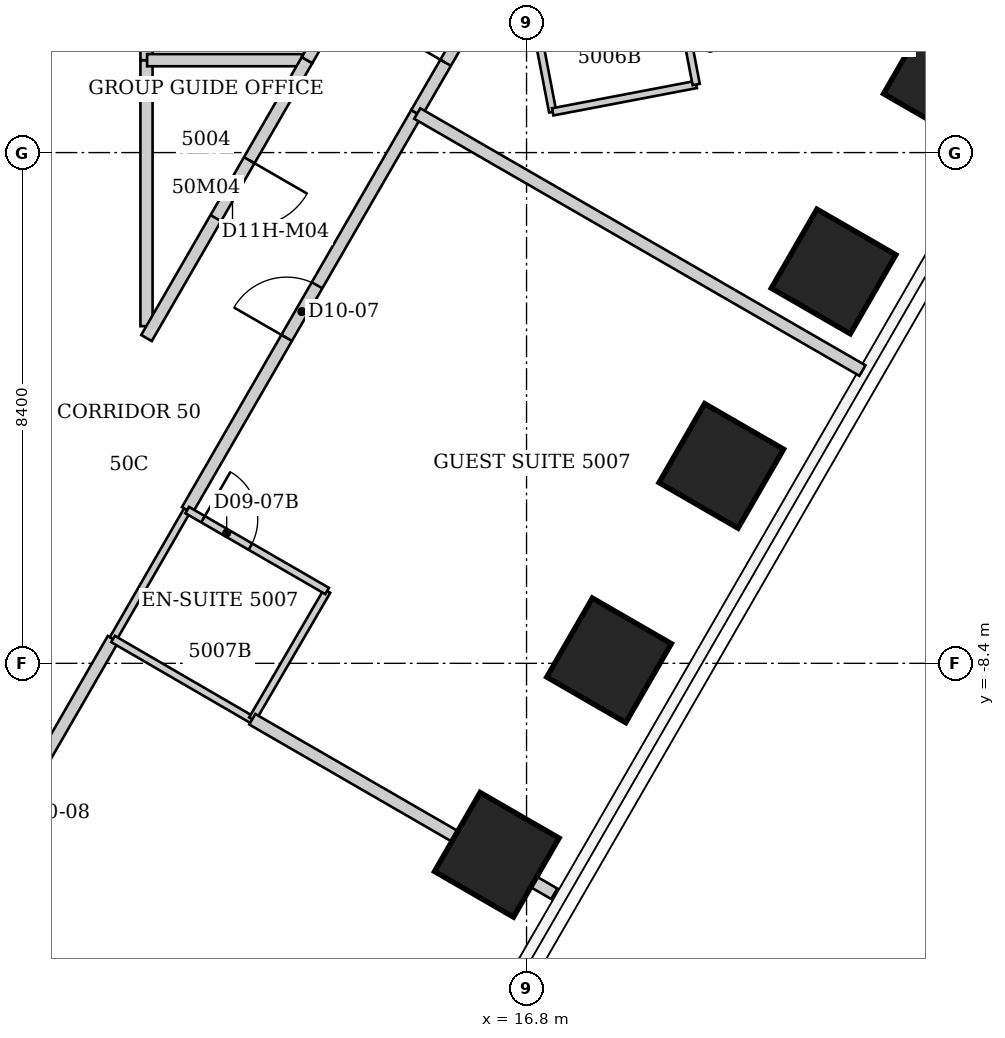
"""IFC4 building model, lengths in metres.
Left out: names, types, materials, properties, quantities, classifications, styles, units other than length and angle.
Written with IfcOpenShell. Run it as: python <this file> out.ifc"""

import sys

from ifc_helpers import new_model, si_unit, direction, frame, frame_2d, origin, origin_2d, place, context, subcontext, project, spatial, rectangle, extrude, element, fill, save


model = new_model("IFC4")
c1 = context("Model", 3, precision=1e-05, world=origin(), true_north=direction((0.0, 1.0)))
c2 = subcontext(c1, "Body", "Model", "MODEL_VIEW")
j1 = project(units=[si_unit("LENGTHUNIT", "METRE"), si_unit("PLANEANGLEUNIT", "RADIAN")], contexts=[c1])
p1 = place(None, origin())
s1 = spatial("IfcSite", under=j1, at=p1, CompositionType="ELEMENT")
p2 = place(p1, origin())
s2 = spatial("IfcBuilding", under=s1, at=p2, CompositionType="ELEMENT")
p3 = place(p2, frame((0.0, 0.0, 202.2)))
s3 = spatial("IfcBuildingStorey", under=s2, at=p3, CompositionType="ELEMENT", Elevation=202.2)
for number, where, z_axis, x_axis in (
    (1, (23.696, 1.242, 0.0), (0.0, 0.0, 1.0), (0.866, -0.5, 0.0)),
    (2, (21.85, -1.956, 0.0), (0.0, 0.0, 1.0), (0.866, -0.5, 0.0)),
    (3, (20.003, -5.153, 0.0), (0.0, 0.0, 1.0), (0.866, -0.5, 0.0)),
    (4, (18.157, -8.351, 0.0), (0.0, 0.0, 1.0), (0.866, -0.5, 0.0)),
    (5, (16.311, -11.549, 0.0), (0.0, 0.0, 1.0), (0.866, -0.5, 0.0)),
):
    element("IfcColumn", number, at=place(p3, frame(where, z_axis=z_axis, x_axis=x_axis)), inside=s3, PredefinedType="COLUMN", context=c2, shape_type="SweptSolid", body=[
        extrude(rectangle(XDim=1.5, YDim=1.5, at=origin_2d()), origin(), (0.0, 0.0, 1.0), 3.8),
    ])
p4 = place(p3, frame((6.7, -13.72, 0.0), z_axis=(0.0, 0.0, 1.0), x_axis=(0.499729921425, 0.866181277581, 0.0)))
e6 = element("IfcWall", 6, at=p4, inside=s3, PredefinedType="PARTITIONING", context=c2, shape_type="SweptSolid", body=[
    extrude(rectangle(XDim=6.604, YDim=0.2, at=frame_2d((3.302, 0.0))), origin(), (0.0, 0.0, 1.0), 3.64),
])
p5 = place(p4, frame((2.802, 0.0, 0.0)))
e7 = element("IfcOpeningElement", 7, at=p5, cuts=e6, PredefinedType="OPENING", context=c2, shape_type="SweptSolid", body=[
    extrude(rectangle(XDim=1.0, YDim=2.13, at=frame_2d((0.5, 1.065))), frame((0.0, 0.1, 0.0), z_axis=(0.0, -1.0, 0.0), x_axis=(1.0, 0.0, 0.0)), (0.0, 0.0, 1.0), 0.2),
])
p6 = place(p3, frame((9.999, -8.0, 0.0), z_axis=(0.0, 0.0, 1.0), x_axis=(0.49917796633, 0.866499485245, 0.0)))
e8 = element("IfcWall", 8, at=p6, inside=s3, PredefinedType="PARTITIONING", context=c2, shape_type="SweptSolid", body=[
    extrude(rectangle(XDim=2.446, YDim=0.12, at=frame_2d((1.223, 0.0))), origin(), (0.0, 0.0, 1.0), 3.64),
])
p7 = place(p3, frame((10.55, -2.855, 0.0), z_axis=(0.0, 0.0, 1.0), x_axis=(0.0, 1.0, 0.0)))
e9 = element("IfcWall", 9, at=p7, inside=s3, PredefinedType="PARTITIONING", context=c2, shape_type="SweptSolid", body=[
    extrude(rectangle(XDim=4.375, YDim=0.2, at=frame_2d((2.188, 0.0))), origin(), (0.0, 0.0, 1.0), 3.64),
])
p8 = place(p3, frame((10.55, 1.52, 0.0), z_axis=(0.0, 0.0, 1.0), x_axis=(0.0, 1.0, 0.0)))
e10 = element("IfcWall", 10, at=p8, inside=s3, PredefinedType="PARTITIONING", context=c2, shape_type="SweptSolid", body=[
    extrude(rectangle(XDim=4.57, YDim=0.2, at=frame_2d((2.285, 0.0))), origin(), (0.0, 0.0, 1.0), 3.64),
])
p9 = place(p8, frame((1.735, 0.0, 0.0)))
e11 = element("IfcOpeningElement", 11, at=p9, cuts=e10, PredefinedType="OPENING", context=c2, shape_type="SweptSolid", body=[
    extrude(rectangle(XDim=1.1, YDim=2.2, at=frame_2d((0.55, 1.1))), frame((0.0, 0.1, 0.0), z_axis=(0.0, -1.0, 0.0), x_axis=(1.0, 0.0, 0.0)), (0.0, 0.0, 1.0), 0.2),
])
p10 = place(p3, frame((10.56, 1.52, 0.0), z_axis=(0.0, 0.0, 1.0), x_axis=(1.0, 0.0, 0.0)))
e12 = element("IfcWall", 12, at=p10, inside=s3, PredefinedType="PARTITIONING", context=c2, shape_type="SweptSolid", body=[
    extrude(rectangle(XDim=2.55, YDim=0.2, at=frame_2d((1.275, 0.0))), origin(), (0.0, 0.0, 1.0), 3.64),
])
p11 = place(p3, frame((11.22, -5.88, 0.0), z_axis=(0.0, 0.0, 1.0), x_axis=(0.500004606796, 0.866022744033, 0.0)))
e13 = element("IfcWall", 13, at=p11, inside=s3, PredefinedType="PARTITIONING", context=c2, shape_type="SweptSolid", body=[
    extrude(rectangle(XDim=7.54, YDim=0.2, at=frame_2d((3.77, 0.0))), origin(), (0.0, 0.0, 1.0), 3.64),
])
p12 = place(p11, frame((3.27, 0.0, 0.0)))
e14 = element("IfcOpeningElement", 14, at=p12, cuts=e13, PredefinedType="OPENING", context=c2, shape_type="SweptSolid", body=[
    extrude(rectangle(XDim=1.0, YDim=2.13, at=frame_2d((0.5, 1.065))), frame((0.0, 0.1, 0.0), z_axis=(0.0, -1.0, 0.0), x_axis=(1.0, 0.0, 0.0)), (0.0, 0.0, 1.0), 0.2),
])
p13 = place(p3, frame((12.29, -9.33, 0.0), z_axis=(0.0, 0.0, 1.0), x_axis=(-0.864726954997, 0.502242265546, 0.0)))
e15 = element("IfcWall", 15, at=p13, inside=s3, PredefinedType="PARTITIONING", context=c2, shape_type="SweptSolid", body=[
    extrude(rectangle(XDim=2.648, YDim=0.12, at=frame_2d((1.324, 0.0))), origin(), (0.0, 0.0, 1.0), 3.038),
])
p14 = place(p3, frame((12.29, -9.32, 0.0), z_axis=(0.0, 0.0, 1.0), x_axis=(0.503591322258, 0.863942000453, 0.0)))
e16 = element("IfcWall", 16, at=p14, inside=s3, PredefinedType="PARTITIONING", context=c2, shape_type="SweptSolid", body=[
    extrude(rectangle(XDim=2.442, YDim=0.12, at=frame_2d((1.221, 0.0))), origin(), (0.0, 0.0, 1.0), 3.64),
])
p15 = place(p3, frame((12.29, -9.32, 0.0), z_axis=(0.0, 0.0, 1.0), x_axis=(0.865820408554, -0.500354894182, 0.0)))
e17 = element("IfcWall", 17, at=p15, inside=s3, PredefinedType="PARTITIONING", context=c2, shape_type="SweptSolid", body=[
    extrude(rectangle(XDim=5.736, YDim=0.2, at=frame_2d((2.868, 0.0))), origin(), (0.0, 0.0, 1.0), 3.038),
])
p16 = place(p3, frame((13.19, 1.52, 0.0), z_axis=(0.0, 0.0, 1.0), x_axis=(-0.500193590286, -0.865913605527, 0.0)))
e18 = element("IfcWall", 18, at=p16, inside=s3, PredefinedType="PARTITIONING", context=c2, shape_type="SweptSolid", body=[
    extrude(rectangle(XDim=5.278, YDim=0.2, at=frame_2d((2.639, 0.0))), origin(), (0.0, 0.0, 1.0), 3.64),
])
p17 = place(p16, frame((1.9, 0.0, 0.0)))
e19 = element("IfcOpeningElement", 19, at=p17, cuts=e18, PredefinedType="OPENING", context=c2, shape_type="SweptSolid", body=[
    extrude(rectangle(XDim=1.1, YDim=2.2, at=frame_2d((0.55, 1.1))), frame((0.0, 0.1, 0.0), z_axis=(0.0, -1.0, 0.0), x_axis=(1.0, 0.0, 0.0)), (0.0, 0.0, 1.0), 0.2),
])
p18 = place(p3, frame((13.52, -7.21, 0.0), z_axis=(0.0, 0.0, 1.0), x_axis=(-0.865675724273, 0.500605174168, 0.0)))
e20 = element("IfcWall", 20, at=p18, inside=s3, PredefinedType="PARTITIONING", context=c2, shape_type="SweptSolid", body=[
    extrude(rectangle(XDim=2.657, YDim=0.12, at=frame_2d((1.329, 0.0))), origin(), (0.0, 0.0, 1.0), 3.64),
])
p19 = place(p18, frame((1.457, 0.0, 0.0)))
e21 = element("IfcOpeningElement", 21, at=p19, cuts=e20, PredefinedType="OPENING", context=c2, shape_type="SweptSolid", body=[
    extrude(rectangle(XDim=0.9, YDim=2.03, at=frame_2d((0.45, 1.015))), frame((0.0, 0.06, 0.0), z_axis=(0.0, -1.0, 0.0), x_axis=(1.0, 0.0, 0.0)), (0.0, 0.0, 1.0), 0.12),
])
p20 = place(p3, frame((14.83, 4.37, 0.0), z_axis=(0.0, 0.0, 1.0), x_axis=(-0.498775186059, -0.866731396554, 0.0)))
e22 = element("IfcWall", 22, at=p20, inside=s3, PredefinedType="PARTITIONING", context=c2, shape_type="SweptSolid", body=[
    extrude(rectangle(XDim=3.288, YDim=0.2, at=frame_2d((1.644, 0.0))), origin(), (0.0, 0.0, 1.0), 3.64),
])
p21 = place(p3, frame((14.99, 0.65, 0.0), z_axis=(0.0, 0.0, 1.0), x_axis=(0.501330358107, 0.865255957529, 0.0)))
e23 = element("IfcWall", 23, at=p21, inside=s3, PredefinedType="PARTITIONING", context=c2, shape_type="SweptSolid", body=[
    extrude(rectangle(XDim=2.912, YDim=0.2, at=frame_2d((1.456, 0.0))), origin(), (0.0, 0.0, 1.0), 3.64),
])
p22 = place(p21, frame((0.956, 0.0, 0.0)))
e24 = element("IfcOpeningElement", 24, at=p22, cuts=e23, PredefinedType="OPENING", context=c2, shape_type="SweptSolid", body=[
    extrude(rectangle(XDim=1.0, YDim=2.13, at=frame_2d((0.5, 1.065))), frame((0.0, 0.1, 0.0), z_axis=(0.0, -1.0, 0.0), x_axis=(1.0, 0.0, 0.0)), (0.0, 0.0, 1.0), 0.2),
])
p23 = place(p3, frame((16.74, 3.22, 0.0), z_axis=(0.0, 0.0, 1.0), x_axis=(0.188697442844, -0.982035271802, 0.0)))
e25 = element("IfcWall", 25, at=p23, inside=s3, PredefinedType="PARTITIONING", context=c2, shape_type="SweptSolid", body=[
    extrude(rectangle(XDim=2.597, YDim=0.12, at=frame_2d((1.298, 0.0))), origin(), (0.0, 0.0, 1.0), 3.64),
])
p24 = place(p3, frame((17.23, 0.67, 0.0), z_axis=(0.0, 0.0, 1.0), x_axis=(0.982288725898, 0.187373581313, 0.0)))
e26 = element("IfcWall", 26, at=p24, inside=s3, PredefinedType="PARTITIONING", context=c2, shape_type="SweptSolid", body=[
    extrude(rectangle(XDim=2.403, YDim=0.12, at=frame_2d((1.201, 0.0))), origin(), (0.0, 0.0, 1.0), 3.64),
])
p25 = place(p3, frame((19.59, 1.12, 0.0), z_axis=(0.0, 0.0, 1.0), x_axis=(-0.188003058159, 0.982168442846, 0.0)))
e27 = element("IfcWall", 27, at=p25, inside=s3, PredefinedType="PARTITIONING", context=c2, shape_type="SweptSolid", body=[
    extrude(rectangle(XDim=2.606, YDim=0.12, at=frame_2d((1.303, 0.0))), origin(), (0.0, 0.0, 1.0), 3.64),
])
p26 = place(p25, frame((1.406, 0.0, 0.0)))
e28 = element("IfcOpeningElement", 28, at=p26, cuts=e27, PredefinedType="OPENING", context=c2, shape_type="SweptSolid", body=[
    extrude(rectangle(XDim=0.9, YDim=2.03, at=frame_2d((0.45, 1.015))), frame((0.0, 0.06, 0.0), z_axis=(0.0, -1.0, 0.0), x_axis=(1.0, 0.0, 0.0)), (0.0, 0.0, 1.0), 0.12),
])
p27 = place(p3, frame((22.324, -3.585, 0.0), z_axis=(0.0, 0.0, 1.0), x_axis=(-0.865987918257, 0.500064921217, 0.0)))
e29 = element("IfcWall", 29, at=p27, inside=s3, PredefinedType="PARTITIONING", context=c2, shape_type="SweptSolid", body=[
    extrude(rectangle(XDim=8.454, YDim=0.2, at=frame_2d((4.227, 0.0))), origin(), (0.0, 0.0, 1.0), 3.64),
])
p28 = place(p22, origin())
e30 = element("IfcDoor", 30, at=p28, inside=s3, OperationType="SINGLE_SWING_LEFT", PredefinedType="DOOR", context=c2, shape_type="SweptSolid", body=[
    extrude(rectangle(XDim=1.0, YDim=2.13, at=frame_2d((0.5, 1.065))), frame((0.0, 0.025, 0.0), z_axis=(0.0, -1.0, 0.0), x_axis=(1.0, 0.0, 0.0)), (0.0, 0.0, 1.0), 0.05),
])
fill(e24, e30)
p29 = place(p12, origin())
e31 = element("IfcDoor", 31, at=p29, inside=s3, OperationType="SINGLE_SWING_LEFT", PredefinedType="DOOR", context=c2, shape_type="SweptSolid", body=[
    extrude(rectangle(XDim=1.0, YDim=2.13, at=frame_2d((0.5, 1.065))), frame((0.0, 0.025, 0.0), z_axis=(0.0, -1.0, 0.0), x_axis=(1.0, 0.0, 0.0)), (0.0, 0.0, 1.0), 0.05),
])
fill(e14, e31)
p30 = place(p19, origin())
e32 = element("IfcDoor", 32, at=p30, inside=s3, OperationType="SINGLE_SWING_RIGHT", PredefinedType="DOOR", context=c2, shape_type="SweptSolid", body=[
    extrude(rectangle(XDim=0.9, YDim=2.03, at=frame_2d((0.45, 1.015))), frame((0.0, 0.025, 0.0), z_axis=(0.0, -1.0, 0.0), x_axis=(1.0, 0.0, 0.0)), (0.0, 0.0, 1.0), 0.05),
])
fill(e21, e32)
p31 = place(p17, origin())
e33 = element("IfcDoor", 33, at=p31, inside=s3, OperationType="SINGLE_SWING_LEFT", PredefinedType="DOOR", context=c2, shape_type="SweptSolid", body=[
    extrude(rectangle(XDim=1.1, YDim=2.2, at=frame_2d((0.55, 1.1))), frame((0.0, 0.025, 0.0), z_axis=(0.0, -1.0, 0.0), x_axis=(1.0, 0.0, 0.0)), (0.0, 0.0, 1.0), 0.05),
])
fill(e19, e33)
save(model, sys.argv[1])
